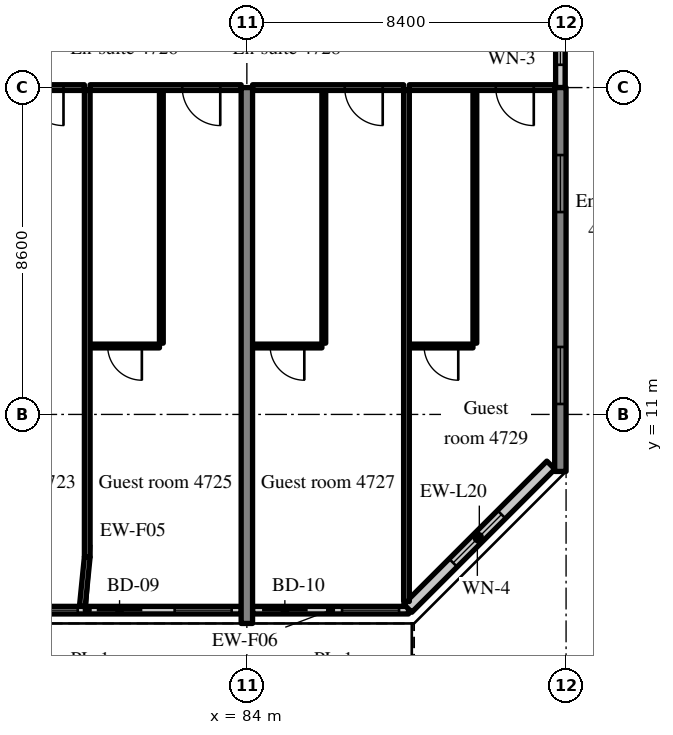
"""IFC4 building model, lengths in metres.
Left out: names, types, materials, properties, quantities, classifications, styles, units other than length and angle.
Written with IfcOpenShell. Run it as: python <this file> out.ifc"""

import sys

from ifc_helpers import new_model, si_unit, direction, frame, frame_2d, origin, place, context, subcontext, project, spatial, rectangle, extrude, source, transform, mapped, element, fill, save


model = new_model("IFC4")
c1 = context("Model", 3, precision=1e-05, world=origin(), true_north=direction((0.0, 1.0)))
c2 = subcontext(c1, "Body", "Model", "MODEL_VIEW")
j1 = project(units=[si_unit("LENGTHUNIT", "METRE"), si_unit("PLANEANGLEUNIT", "RADIAN")], contexts=[c1])
p1 = place(None, origin())
s1 = spatial("IfcSite", under=j1, at=p1, CompositionType="ELEMENT")
p2 = place(p1, origin())
s2 = spatial("IfcBuilding", under=s1, at=p2, CompositionType="ELEMENT")
p3 = place(p2, frame((0.0, 0.0, 193.4)))
s3 = spatial("IfcBuildingStorey", under=s2, at=p3, CompositionType="ELEMENT", Elevation=193.4)
m1 = source(origin(), c2, "Body", "SweptSolid", [
    extrude(rectangle(XDim=14.1, YDim=0.3, at=frame_2d((7.05, 0.0))), origin(), (0.0, 0.0, 1.0), 3.52),
])
p4 = place(p3, frame((84.0, 5.5, 0.0), z_axis=(0.0, 0.0, 1.0), x_axis=(0.0, 1.0, 0.0)))
e1 = element("IfcWall", 1, at=p4, inside=s3, PredefinedType="SHEAR", context=c2, shape_type="MappedRepresentation", body=[
    mapped(m1, transform((0.0, 0.0, 0.0), scale=1.0)),
])
m2 = source(origin(), c2, "Body", "SweptSolid", [
    extrude(rectangle(XDim=10.1, YDim=0.3, at=frame_2d((5.05, 0.0))), origin(), (0.0, 0.0, 1.0), 3.52),
])
p5 = place(p3, frame((92.25, 9.5, 0.0), z_axis=(0.0, 0.0, 1.0), x_axis=(0.0, 1.0, 0.0)))
e2 = element("IfcWall", 2, at=p5, inside=s3, PredefinedType="SHEAR", context=c2, shape_type="MappedRepresentation", body=[
    mapped(m2, transform((0.0, 0.0, 0.0), scale=1.0)),
])
m3 = source(origin(), c2, "Body", "SweptSolid", [
    extrude(rectangle(XDim=1.5, YDim=1.5, at=frame_2d((0.75, 0.75))), frame((0.0, 0.16, 0.0), z_axis=(0.0, -1.0, 0.0), x_axis=(1.0, 0.0, 0.0)), (0.0, 0.0, 1.0), 0.32),
])
p6 = place(p5, frame((1.775, 0.0, 0.9)))
e3 = element("IfcOpeningElement", 3, at=p6, cuts=e2, PredefinedType="OPENING", context=c2, shape_type="MappedRepresentation", body=[
    mapped(m3, transform((0.0, 0.0, 0.0), scale=1.0)),
])
p7 = place(p5, frame((6.825, 0.0, 0.9)))
e4 = element("IfcOpeningElement", 4, at=p7, cuts=e2, PredefinedType="OPENING", context=c2, shape_type="MappedRepresentation", body=[
    mapped(m3, transform((0.0, 0.0, 0.0), scale=1.0)),
])
m4 = source(origin(), c2, "Body", "SweptSolid", [
    extrude(rectangle(XDim=8.1, YDim=0.2, at=frame_2d((4.05, 0.0))), origin(), (0.0, 0.0, 1.0), 2.87),
])
p8 = place(p3, frame((75.75, 5.85, 0.0), z_axis=(0.0, 0.0, 1.0), x_axis=(1.0, 0.0, 0.0)))
e5 = element("IfcWall", 5, at=p8, inside=s3, PredefinedType="SOLIDWALL", context=c2, shape_type="MappedRepresentation", body=[
    mapped(m4, transform((0.0, 0.0, 0.0), scale=1.0)),
])
m5 = source(origin(), c2, "Body", "SweptSolid", [
    extrude(rectangle(XDim=1.2, YDim=2.4, at=frame_2d((0.6, 1.2))), frame((0.0, 0.11, 0.0), z_axis=(0.0, -1.0, 0.0), x_axis=(1.0, 0.0, 0.0)), (0.0, 0.0, 1.0), 0.22),
])
p9 = place(p8, frame((0.25, 0.0, 0.0)))
e6 = element("IfcOpeningElement", 6, at=p9, cuts=e5, PredefinedType="OPENING", context=c2, shape_type="MappedRepresentation", body=[
    mapped(m5, transform((0.0, 0.0, 0.0), scale=1.0)),
])
m6 = source(origin(), c2, "Body", "SweptSolid", [
    extrude(rectangle(XDim=1.5, YDim=1.5, at=frame_2d((0.75, 0.75))), frame((0.0, 0.11, 0.0), z_axis=(0.0, -1.0, 0.0), x_axis=(1.0, 0.0, 0.0)), (0.0, 0.0, 1.0), 0.22),
])
p10 = place(p8, frame((2.3, 0.0, 0.9)))
e7 = element("IfcOpeningElement", 7, at=p10, cuts=e5, PredefinedType="OPENING", context=c2, shape_type="MappedRepresentation", body=[
    mapped(m6, transform((0.0, 0.0, 0.0), scale=1.0)),
])
p11 = place(p8, frame((4.3, 0.0, 0.0)))
e8 = element("IfcOpeningElement", 8, at=p11, cuts=e5, PredefinedType="OPENING", context=c2, shape_type="MappedRepresentation", body=[
    mapped(m5, transform((0.0, 0.0, 0.0), scale=1.0)),
])
p12 = place(p8, frame((6.35, 0.0, 0.9)))
e9 = element("IfcOpeningElement", 9, at=p12, cuts=e5, PredefinedType="OPENING", context=c2, shape_type="MappedRepresentation", body=[
    mapped(m6, transform((0.0, 0.0, 0.0), scale=1.0)),
])
m7 = source(origin(), c2, "Body", "SweptSolid", [
    extrude(rectangle(XDim=4.105, YDim=0.2, at=frame_2d((2.052, 0.0))), origin(), (0.0, 0.0, 1.0), 2.87),
])
p13 = place(p3, frame((84.15, 5.85, 0.0), z_axis=(0.0, 0.0, 1.0), x_axis=(1.0, 0.0, 0.0)))
e10 = element("IfcWall", 10, at=p13, inside=s3, PredefinedType="SOLIDWALL", context=c2, shape_type="MappedRepresentation", body=[
    mapped(m7, transform((0.0, 0.0, 0.0), scale=1.0)),
])
p14 = place(p13, frame((0.25, 0.0, 0.0)))
e11 = element("IfcOpeningElement", 11, at=p14, cuts=e10, PredefinedType="OPENING", context=c2, shape_type="MappedRepresentation", body=[
    mapped(m5, transform((0.0, 0.0, 0.0), scale=1.0)),
])
p15 = place(p13, frame((2.355, 0.0, 0.9)))
e12 = element("IfcOpeningElement", 12, at=p15, cuts=e10, PredefinedType="OPENING", context=c2, shape_type="MappedRepresentation", body=[
    mapped(m6, transform((0.0, 0.0, 0.0), scale=1.0)),
])
m8 = source(origin(), c2, "Body", "SweptSolid", [
    extrude(rectangle(XDim=5.326, YDim=0.3, at=frame_2d((2.663, 0.0))), origin(), (0.0, 0.0, 1.0), 3.52),
])
p16 = place(p3, frame((88.234, 5.9, 0.0), z_axis=(0.0, 0.0, 1.0), x_axis=(0.707083859269, 0.707129702361, 0.0)))
e13 = element("IfcWall", 13, at=p16, inside=s3, PredefinedType="SOLIDWALL", context=c2, shape_type="MappedRepresentation", body=[
    mapped(m8, transform((0.0, 0.0, 0.0), scale=1.0)),
])
m9 = source(origin(), c2, "Body", "SweptSolid", [
    extrude(rectangle(XDim=1.8, YDim=1.5, at=frame_2d((0.9, 0.75))), frame((0.0, 0.16, 0.0), z_axis=(0.0, -1.0, 0.0), x_axis=(1.0, 0.0, 0.0)), (0.0, 0.0, 1.0), 0.32),
])
p17 = place(p16, frame((1.689, 0.0, 0.9)))
e14 = element("IfcOpeningElement", 14, at=p17, cuts=e13, PredefinedType="OPENING", context=c2, shape_type="MappedRepresentation", body=[
    mapped(m9, transform((0.0, 0.0, 0.0), scale=1.0)),
])
m10 = source(origin(), c2, "Body", "SweptSolid", [
    extrude(rectangle(XDim=2.4, YDim=0.25, at=frame_2d((1.2, 0.0))), origin(), (0.0, 0.0, 1.0), 2.62),
])
p18 = place(p3, frame((92.25, 19.6, 0.0), z_axis=(0.0, 0.0, 1.0), x_axis=(0.0, 1.0, 0.0)))
e15 = element("IfcWall", 15, at=p18, inside=s3, PredefinedType="SOLIDWALL", context=c2, shape_type="MappedRepresentation", body=[
    mapped(m10, transform((0.0, 0.0, 0.0), scale=1.0)),
])
m11 = source(origin(), c2, "Body", "SweptSolid", [
    extrude(rectangle(XDim=1.2, YDim=1.5, at=frame_2d((0.6, 0.75))), frame((0.0, 0.135, 0.0), z_axis=(0.0, -1.0, 0.0), x_axis=(1.0, 0.0, 0.0)), (0.0, 0.0, 1.0), 0.27),
])
p19 = place(p18, frame((0.6, 0.0, 0.9)))
e16 = element("IfcOpeningElement", 16, at=p19, cuts=e15, PredefinedType="OPENING", context=c2, shape_type="MappedRepresentation", body=[
    mapped(m11, transform((0.0, 0.0, 0.0), scale=1.0)),
])
m12 = source(origin(), c2, "Body", "SweptSolid", [
    extrude(rectangle(XDim=3.975, YDim=0.15, at=frame_2d((1.988, 0.0))), origin(), (0.0, 0.0, 1.0), 2.82),
])
p20 = place(p3, frame((75.75, 19.6, 0.0), z_axis=(0.0, 0.0, 1.0), x_axis=(1.0, 0.0, 0.0)))
e17 = element("IfcWall", 17, at=p20, inside=s3, PredefinedType="PARTITIONING", context=c2, shape_type="MappedRepresentation", body=[
    mapped(m12, transform((0.0, 0.0, 0.0), scale=1.0)),
])
m13 = source(origin(), c2, "Body", "SweptSolid", [
    extrude(rectangle(XDim=1.0, YDim=2.1, at=frame_2d((0.5, 1.05))), frame((0.0, 0.085, 0.0), z_axis=(0.0, -1.0, 0.0), x_axis=(1.0, 0.0, 0.0)), (0.0, 0.0, 1.0), 0.17),
])
p21 = place(p20, frame((2.425, 0.0, 0.0)))
e18 = element("IfcOpeningElement", 18, at=p21, cuts=e17, PredefinedType="OPENING", context=c2, shape_type="MappedRepresentation", body=[
    mapped(m13, transform((0.0, 0.0, 0.0), scale=1.0)),
])
m14 = source(origin(), c2, "Body", "SweptSolid", [
    extrude(rectangle(XDim=6.65, YDim=0.1, at=frame_2d((3.325, 0.0))), origin(), (0.0, 0.0, 1.0), 3.52),
])
p22 = place(p3, frame((81.75, 12.875, 0.0), z_axis=(0.0, 0.0, 1.0), x_axis=(0.0, 1.0, 0.0)))
e19 = element("IfcWall", 19, at=p22, inside=s3, PredefinedType="PARTITIONING", context=c2, shape_type="MappedRepresentation", body=[
    mapped(m14, transform((0.0, 0.0, 0.0), scale=1.0)),
])
m15 = source(origin(), c2, "Body", "SweptSolid", [
    extrude(rectangle(XDim=1.825, YDim=0.1, at=frame_2d((0.913, 0.0))), origin(), (0.0, 0.0, 1.0), 3.52),
])
p23 = place(p3, frame((79.875, 12.8, 0.0), z_axis=(0.0, 0.0, 1.0), x_axis=(1.0, 0.0, 0.0)))
e20 = element("IfcWall", 20, at=p23, inside=s3, PredefinedType="PARTITIONING", context=c2, shape_type="MappedRepresentation", body=[
    mapped(m15, transform((0.0, 0.0, 0.0), scale=1.0)),
])
m16 = source(origin(), c2, "Body", "SweptSolid", [
    extrude(rectangle(XDim=0.9, YDim=2.1, at=frame_2d((0.45, 1.05))), frame((0.0, 0.06, 0.0), z_axis=(0.0, -1.0, 0.0), x_axis=(1.0, 0.0, 0.0)), (0.0, 0.0, 1.0), 0.12),
])
p24 = place(p23, frame((0.462, 0.0, 0.0)))
e21 = element("IfcOpeningElement", 21, at=p24, cuts=e20, PredefinedType="OPENING", context=c2, shape_type="MappedRepresentation", body=[
    mapped(m16, transform((0.0, 0.0, 0.0), scale=1.0)),
])
p25 = place(p3, frame((79.875, 19.6, 0.0), z_axis=(0.0, 0.0, 1.0), x_axis=(1.0, 0.0, 0.0)))
e22 = element("IfcWall", 22, at=p25, inside=s3, PredefinedType="PARTITIONING", context=c2, shape_type="MappedRepresentation", body=[
    mapped(m12, transform((0.0, 0.0, 0.0), scale=1.0)),
])
p26 = place(p25, frame((2.425, 0.0, 0.0)))
e23 = element("IfcOpeningElement", 23, at=p26, cuts=e22, PredefinedType="OPENING", context=c2, shape_type="MappedRepresentation", body=[
    mapped(m13, transform((0.0, 0.0, 0.0), scale=1.0)),
])
m17 = source(origin(), c2, "Body", "SweptSolid", [
    extrude(rectangle(XDim=12.275, YDim=0.15, at=frame_2d((6.137, 0.0))), origin(), (0.0, 0.0, 1.0), 3.52),
])
p27 = place(p3, frame((79.8, 7.25, 0.0), z_axis=(0.0, 0.0, 1.0), x_axis=(0.0, 1.0, 0.0)))
e24 = element("IfcWall", 24, at=p27, inside=s3, PredefinedType="PARTITIONING", context=c2, shape_type="MappedRepresentation", body=[
    mapped(m17, transform((0.0, 0.0, 0.0), scale=1.0)),
])
p28 = place(p3, frame((86.025, 12.875, 0.0), z_axis=(0.0, 0.0, 1.0), x_axis=(0.0, 1.0, 0.0)))
e25 = element("IfcWall", 25, at=p28, inside=s3, PredefinedType="PARTITIONING", context=c2, shape_type="MappedRepresentation", body=[
    mapped(m14, transform((0.0, 0.0, 0.0), scale=1.0)),
])
m18 = source(origin(), c2, "Body", "SweptSolid", [
    extrude(rectangle(XDim=1.825, YDim=0.1, at=frame_2d((0.913, 0.0))), origin(), (0.0, 0.0, 1.0), 3.52),
])
p29 = place(p3, frame((84.15, 12.8, 0.0), z_axis=(0.0, 0.0, 1.0), x_axis=(1.0, 0.0, 0.0)))
e26 = element("IfcWall", 26, at=p29, inside=s3, PredefinedType="PARTITIONING", context=c2, shape_type="MappedRepresentation", body=[
    mapped(m18, transform((0.0, 0.0, 0.0), scale=1.0)),
])
p30 = place(p29, frame((0.462, 0.0, 0.0)))
e27 = element("IfcOpeningElement", 27, at=p30, cuts=e26, PredefinedType="OPENING", context=c2, shape_type="MappedRepresentation", body=[
    mapped(m16, transform((0.0, 0.0, 0.0), scale=1.0)),
])
p31 = place(p3, frame((84.15, 19.6, 0.0), z_axis=(0.0, 0.0, 1.0), x_axis=(1.0, 0.0, 0.0)))
e28 = element("IfcWall", 28, at=p31, inside=s3, PredefinedType="PARTITIONING", context=c2, shape_type="MappedRepresentation", body=[
    mapped(m12, transform((0.0, 0.0, 0.0), scale=1.0)),
])
p32 = place(p31, frame((2.425, 0.0, 0.0)))
e29 = element("IfcOpeningElement", 29, at=p32, cuts=e28, PredefinedType="OPENING", context=c2, shape_type="MappedRepresentation", body=[
    mapped(m13, transform((0.0, 0.0, 0.0), scale=1.0)),
])
p33 = place(p3, frame((90.0, 12.875, 0.0), z_axis=(0.0, 0.0, 1.0), x_axis=(0.0, 1.0, 0.0)))
e30 = element("IfcWall", 30, at=p33, inside=s3, PredefinedType="PARTITIONING", context=c2, shape_type="MappedRepresentation", body=[
    mapped(m14, transform((0.0, 0.0, 0.0), scale=1.0)),
])
m19 = source(origin(), c2, "Body", "SweptSolid", [
    extrude(rectangle(XDim=1.675, YDim=0.1, at=frame_2d((0.837, 0.0))), origin(), (0.0, 0.0, 1.0), 3.52),
])
p34 = place(p3, frame((88.275, 12.8, 0.0), z_axis=(0.0, 0.0, 1.0), x_axis=(1.0, 0.0, 0.0)))
e31 = element("IfcWall", 31, at=p34, inside=s3, PredefinedType="PARTITIONING", context=c2, shape_type="MappedRepresentation", body=[
    mapped(m19, transform((0.0, 0.0, 0.0), scale=1.0)),
])
p35 = place(p34, frame((0.388, 0.0, 0.0)))
e32 = element("IfcOpeningElement", 32, at=p35, cuts=e31, PredefinedType="OPENING", context=c2, shape_type="MappedRepresentation", body=[
    mapped(m16, transform((0.0, 0.0, 0.0), scale=1.0)),
])
m20 = source(origin(), c2, "Body", "SweptSolid", [
    extrude(rectangle(XDim=3.825, YDim=0.15, at=frame_2d((1.913, 0.0))), origin(), (0.0, 0.0, 1.0), 2.82),
])
p36 = place(p3, frame((88.275, 19.6, 0.0), z_axis=(0.0, 0.0, 1.0), x_axis=(1.0, 0.0, 0.0)))
e33 = element("IfcWall", 33, at=p36, inside=s3, PredefinedType="PARTITIONING", context=c2, shape_type="MappedRepresentation", body=[
    mapped(m20, transform((0.0, 0.0, 0.0), scale=1.0)),
])
p37 = place(p36, frame((2.275, 0.0, 0.0)))
e34 = element("IfcOpeningElement", 34, at=p37, cuts=e33, PredefinedType="OPENING", context=c2, shape_type="MappedRepresentation", body=[
    mapped(m13, transform((0.0, 0.0, 0.0), scale=1.0)),
])
m21 = source(origin(), c2, "Body", "SweptSolid", [
    extrude(rectangle(XDim=13.447, YDim=0.15, at=frame_2d((6.724, 0.0))), origin(), (0.0, 0.0, 1.0), 3.52),
])
p38 = place(p3, frame((88.2, 6.078, 0.0), z_axis=(0.0, 0.0, 1.0), x_axis=(0.0, 1.0, 0.0)))
e35 = element("IfcWall", 35, at=p38, inside=s3, PredefinedType="PARTITIONING", context=c2, shape_type="MappedRepresentation", body=[
    mapped(m21, transform((0.0, 0.0, 0.0), scale=1.0)),
])
m22 = source(origin(), c2, "Body", "SweptSolid", [
    extrude(rectangle(XDim=1.307, YDim=0.15, at=frame_2d((0.653, 0.0))), origin(), (0.0, 0.0, 1.0), 3.52),
])
p39 = place(p3, frame((79.67, 5.95, 0.0), z_axis=(0.0, 0.0, 1.0), x_axis=(0.099596223396, 0.99502793543, 0.0)))
e36 = element("IfcWall", 36, at=p39, inside=s3, PredefinedType="PARTITIONING", context=c2, shape_type="MappedRepresentation", body=[
    mapped(m22, transform((0.0, 0.0, 0.0), scale=1.0)),
])
m23 = source(origin(), c2, "Body", "SweptSolid", [
    extrude(rectangle(XDim=1.5, YDim=1.5, at=frame_2d((0.75, 0.75))), frame((0.0, 0.03, 0.0), z_axis=(0.0, -1.0, 0.0), x_axis=(1.0, 0.0, 0.0)), (0.0, 0.0, 1.0), 0.06),
])
p40 = place(p10, origin())
e37 = element("IfcWindow", 37, at=p40, inside=s3, PartitioningType="SINGLE_PANEL", PredefinedType="WINDOW", context=c2, shape_type="MappedRepresentation", body=[
    mapped(m23, transform((0.0, 0.0, 0.0), scale=1.0)),
])
fill(e7, e37)
m24 = source(origin(), c2, "Body", "SweptSolid", [
    extrude(rectangle(XDim=1.2, YDim=2.4, at=frame_2d((0.6, 1.2))), frame((0.0, 0.025, 0.0), z_axis=(0.0, -1.0, 0.0), x_axis=(1.0, 0.0, 0.0)), (0.0, 0.0, 1.0), 0.05),
])
p41 = place(p11, origin())
e38 = element("IfcDoor", 38, at=p41, inside=s3, OperationType="SLIDING_TO_LEFT", PredefinedType="DOOR", context=c2, shape_type="MappedRepresentation", body=[
    mapped(m24, transform((0.0, 0.0, 0.0), scale=1.0)),
])
fill(e8, e38)
p42 = place(p12, origin())
e39 = element("IfcWindow", 39, at=p42, inside=s3, PartitioningType="SINGLE_PANEL", PredefinedType="WINDOW", context=c2, shape_type="MappedRepresentation", body=[
    mapped(m23, transform((0.0, 0.0, 0.0), scale=1.0)),
])
fill(e9, e39)
p43 = place(p14, origin())
e40 = element("IfcDoor", 40, at=p43, inside=s3, OperationType="SLIDING_TO_RIGHT", PredefinedType="DOOR", context=c2, shape_type="MappedRepresentation", body=[
    mapped(m24, transform((0.0, 0.0, 0.0), scale=1.0)),
])
fill(e11, e40)
p44 = place(p15, origin())
e41 = element("IfcWindow", 41, at=p44, inside=s3, PartitioningType="SINGLE_PANEL", PredefinedType="WINDOW", context=c2, shape_type="MappedRepresentation", body=[
    mapped(m23, transform((0.0, 0.0, 0.0), scale=1.0)),
])
fill(e12, e41)
m25 = source(origin(), c2, "Body", "SweptSolid", [
    extrude(rectangle(XDim=1.8, YDim=1.5, at=frame_2d((0.9, 0.75))), frame((0.0, 0.03, 0.0), z_axis=(0.0, -1.0, 0.0), x_axis=(1.0, 0.0, 0.0)), (0.0, 0.0, 1.0), 0.06),
])
p45 = place(p17, origin())
e42 = element("IfcWindow", 42, at=p45, inside=s3, PartitioningType="SINGLE_PANEL", PredefinedType="WINDOW", context=c2, shape_type="MappedRepresentation", body=[
    mapped(m25, transform((0.0, 0.0, 0.0), scale=1.0)),
])
fill(e14, e42)
p46 = place(p6, origin())
e43 = element("IfcWindow", 43, at=p46, inside=s3, PartitioningType="SINGLE_PANEL", PredefinedType="WINDOW", context=c2, shape_type="MappedRepresentation", body=[
    mapped(m23, transform((0.0, 0.0, 0.0), scale=1.0)),
])
fill(e3, e43)
p47 = place(p7, origin())
e44 = element("IfcWindow", 44, at=p47, inside=s3, PartitioningType="SINGLE_PANEL", PredefinedType="WINDOW", context=c2, shape_type="MappedRepresentation", body=[
    mapped(m23, transform((0.0, 0.0, 0.0), scale=1.0)),
])
fill(e4, e44)
m26 = source(origin(), c2, "Body", "SweptSolid", [
    extrude(rectangle(XDim=1.2, YDim=1.5, at=frame_2d((0.6, 0.75))), frame((0.0, 0.03, 0.0), z_axis=(0.0, -1.0, 0.0), x_axis=(1.0, 0.0, 0.0)), (0.0, 0.0, 1.0), 0.06),
])
p48 = place(p19, origin())
e45 = element("IfcWindow", 45, at=p48, inside=s3, PartitioningType="SINGLE_PANEL", PredefinedType="WINDOW", context=c2, shape_type="MappedRepresentation", body=[
    mapped(m26, transform((0.0, 0.0, 0.0), scale=1.0)),
])
fill(e16, e45)
m27 = source(origin(), c2, "Body", "SweptSolid", [
    extrude(rectangle(XDim=1.0, YDim=2.1, at=frame_2d((0.5, 1.05))), frame((0.0, 0.025, 0.0), z_axis=(0.0, -1.0, 0.0), x_axis=(1.0, 0.0, 0.0)), (0.0, 0.0, 1.0), 0.05),
])
p49 = place(p21, origin())
e46 = element("IfcDoor", 46, at=p49, inside=s3, OperationType="SINGLE_SWING_RIGHT", PredefinedType="DOOR", context=c2, shape_type="MappedRepresentation", body=[
    mapped(m27, transform((0.0, 0.0, 0.0), scale=1.0)),
])
fill(e18, e46)
m28 = source(origin(), c2, "Body", "SweptSolid", [
    extrude(rectangle(XDim=0.9, YDim=2.1, at=frame_2d((0.45, 1.05))), frame((0.0, 0.025, 0.0), z_axis=(0.0, -1.0, 0.0), x_axis=(1.0, 0.0, 0.0)), (0.0, 0.0, 1.0), 0.05),
])
p50 = place(p24, origin())
e47 = element("IfcDoor", 47, at=p50, inside=s3, OperationType="SINGLE_SWING_RIGHT", PredefinedType="DOOR", context=c2, shape_type="MappedRepresentation", body=[
    mapped(m28, transform((0.0, 0.0, 0.0), scale=1.0)),
])
fill(e21, e47)
p51 = place(p26, origin())
e48 = element("IfcDoor", 48, at=p51, inside=s3, OperationType="SINGLE_SWING_RIGHT", PredefinedType="DOOR", context=c2, shape_type="MappedRepresentation", body=[
    mapped(m27, transform((0.0, 0.0, 0.0), scale=1.0)),
])
fill(e23, e48)
p52 = place(p30, origin())
e49 = element("IfcDoor", 49, at=p52, inside=s3, OperationType="SINGLE_SWING_RIGHT", PredefinedType="DOOR", context=c2, shape_type="MappedRepresentation", body=[
    mapped(m28, transform((0.0, 0.0, 0.0), scale=1.0)),
])
fill(e27, e49)
p53 = place(p32, origin())
e50 = element("IfcDoor", 50, at=p53, inside=s3, OperationType="SINGLE_SWING_RIGHT", PredefinedType="DOOR", context=c2, shape_type="MappedRepresentation", body=[
    mapped(m27, transform((0.0, 0.0, 0.0), scale=1.0)),
])
fill(e29, e50)
p54 = place(p35, origin())
e51 = element("IfcDoor", 51, at=p54, inside=s3, OperationType="SINGLE_SWING_RIGHT", PredefinedType="DOOR", context=c2, shape_type="MappedRepresentation", body=[
    mapped(m28, transform((0.0, 0.0, 0.0), scale=1.0)),
])
fill(e32, e51)
p55 = place(p37, origin())
e52 = element("IfcDoor", 52, at=p55, inside=s3, OperationType="SINGLE_SWING_RIGHT", PredefinedType="DOOR", context=c2, shape_type="MappedRepresentation", body=[
    mapped(m27, transform((0.0, 0.0, 0.0), scale=1.0)),
])
fill(e34, e52)
save(model, sys.argv[1])
